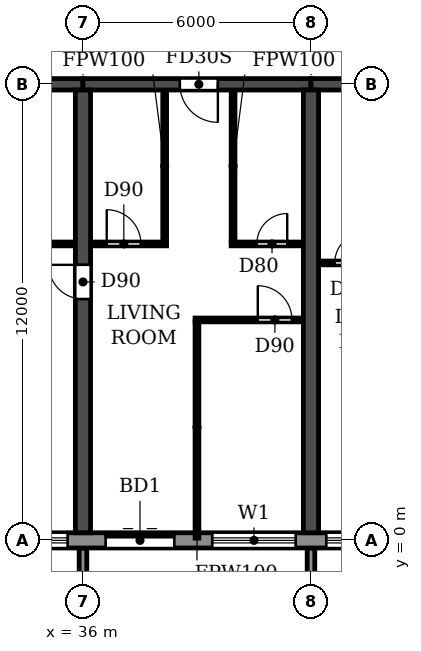
"""IFC4 building model, lengths in metres.
Left out: names, types, materials, properties, quantities, classifications, styles, units other than length and angle.
Written with IfcOpenShell. Run it as: python <this file> out.ifc"""

import sys

from ifc_helpers import new_model, si_unit, direction, frame, frame_2d, origin, place, context, subcontext, project, spatial, polyline, rectangle, outline, extrude, source, transform, mapped, element, fill, save


model = new_model("IFC4")
c1 = context("Model", 3, precision=1e-05, world=origin(), true_north=direction((0.0, 1.0)))
c2 = subcontext(c1, "Body", "Model", "MODEL_VIEW")
j1 = project(units=[si_unit("LENGTHUNIT", "METRE"), si_unit("PLANEANGLEUNIT", "RADIAN")], contexts=[c1])
p1 = place(None, origin())
s1 = spatial("IfcSite", under=j1, at=p1, CompositionType="ELEMENT")
p2 = place(p1, origin())
s2 = spatial("IfcBuilding", under=s1, at=p2, CompositionType="ELEMENT")
p3 = place(p2, frame((0.0, 0.0, 26.7)))
s3 = spatial("IfcBuildingStorey", under=s2, at=p3, CompositionType="ELEMENT", Elevation=26.7)
p4 = place(p3, frame((36.0, 0.2, 0.0), z_axis=(0.0, 0.0, 1.0), x_axis=(0.0, 1.0, 0.0)))
e1 = element("IfcWall", 1, at=p4, inside=s3, PredefinedType="SHEAR", context=c2, shape_type="SweptSolid", body=[
    extrude(rectangle(XDim=11.65, YDim=0.4, at=frame_2d((5.825, 0.0))), origin(), (0.0, 0.0, 1.0), 3.05),
])
p5 = place(p4, frame((6.15, 0.0, 0.0)))
e2 = element("IfcOpeningElement", 2, at=p5, cuts=e1, PredefinedType="OPENING", context=c2, shape_type="SweptSolid", body=[
    extrude(rectangle(XDim=0.9, YDim=2.1, at=frame_2d((0.45, 1.05))), frame((0.0, 0.21, 0.0), z_axis=(0.0, -1.0, 0.0), x_axis=(1.0, 0.0, 0.0)), (0.0, 0.0, 1.0), 0.42),
])
p6 = place(p3, frame((42.0, 0.2, 0.0), z_axis=(0.0, 0.0, 1.0), x_axis=(0.0, 1.0, 0.0)))
e3 = element("IfcWall", 3, at=p6, inside=s3, PredefinedType="SHEAR", context=c2, shape_type="SweptSolid", body=[
    extrude(rectangle(XDim=11.65, YDim=0.4, at=frame_2d((5.825, 0.0))), origin(), (0.0, 0.0, 1.0), 3.05),
])
p7 = place(p3, frame((30.0, 12.0, 0.0), z_axis=(0.0, 0.0, 1.0), x_axis=(1.0, 0.0, 0.0)))
e4 = element("IfcWall", 4, at=p7, inside=s3, PredefinedType="SHEAR", context=c2, shape_type="SweptSolid", body=[
    extrude(rectangle(XDim=6.0, YDim=0.3, at=frame_2d((3.0, 0.0))), origin(), (0.0, 0.0, 1.0), 2.45),
])
p8 = place(p3, frame((36.0, 12.0, 0.0), z_axis=(0.0, 0.0, 1.0), x_axis=(1.0, 0.0, 0.0)))
e5 = element("IfcWall", 5, at=p8, inside=s3, PredefinedType="SHEAR", context=c2, shape_type="SweptSolid", body=[
    extrude(rectangle(XDim=6.0, YDim=0.3, at=frame_2d((3.0, 0.0))), origin(), (0.0, 0.0, 1.0), 2.45),
])
p9 = place(p8, frame((2.55, 0.0, 0.0)))
e6 = element("IfcOpeningElement", 6, at=p9, cuts=e5, PredefinedType="OPENING", context=c2, shape_type="SweptSolid", body=[
    extrude(rectangle(XDim=1.0, YDim=2.1, at=frame_2d((0.5, 1.05))), frame((0.0, 0.16, 0.0), z_axis=(0.0, -1.0, 0.0), x_axis=(1.0, 0.0, 0.0)), (0.0, 0.0, 1.0), 0.32),
])
p10 = place(p3, frame((42.0, 12.0, 0.0), z_axis=(0.0, 0.0, 1.0), x_axis=(1.0, 0.0, 0.0)))
e7 = element("IfcWall", 7, at=p10, inside=s3, PredefinedType="SHEAR", context=c2, shape_type="SweptSolid", body=[
    extrude(rectangle(XDim=6.0, YDim=0.3, at=frame_2d((3.0, 0.0))), origin(), (0.0, 0.0, 1.0), 2.45),
])
p11 = place(p10, frame((2.45, 0.0, 0.0)))
e8 = element("IfcOpeningElement", 8, at=p11, cuts=e7, PredefinedType="OPENING", context=c2, shape_type="SweptSolid", body=[
    extrude(rectangle(XDim=1.0, YDim=2.1, at=frame_2d((0.5, 1.05))), frame((0.0, 0.16, 0.0), z_axis=(0.0, -1.0, 0.0), x_axis=(1.0, 0.0, 0.0)), (0.0, 0.0, 1.0), 0.32),
])
p12 = place(p3, frame((4.683, 0.0, 0.0), z_axis=(0.0, 0.0, 1.0), x_axis=(1.0, 0.0, 0.0)))
e9 = element("IfcWall", 9, at=p12, inside=s3, PredefinedType="STANDARD", context=c2, shape_type="SweptSolid", body=[
    extrude(rectangle(XDim=92.634, YDim=0.4, at=frame_2d((46.317, 0.0))), origin(), (0.0, 0.0, 1.0), 3.05),
])
p13 = place(p12, frame((1.717, 0.0, 0.9)))
e10 = element("IfcOpeningElement", 10, at=p13, cuts=e9, PredefinedType="OPENING", context=c2, shape_type="SweptSolid", body=[
    extrude(rectangle(XDim=2.2, YDim=1.5, at=frame_2d((1.1, 0.75))), frame((0.0, 0.21, 0.0), z_axis=(0.0, -1.0, 0.0), x_axis=(1.0, 0.0, 0.0)), (0.0, 0.0, 1.0), 0.42),
])
p14 = place(p12, frame((4.717, 0.0, 0.9)))
e11 = element("IfcOpeningElement", 11, at=p14, cuts=e9, PredefinedType="OPENING", context=c2, shape_type="SweptSolid", body=[
    extrude(rectangle(XDim=2.2, YDim=1.5, at=frame_2d((1.1, 0.75))), frame((0.0, 0.21, 0.0), z_axis=(0.0, -1.0, 0.0), x_axis=(1.0, 0.0, 0.0)), (0.0, 0.0, 1.0), 0.42),
])
p15 = place(p12, frame((7.717, 0.0, 0.9)))
e12 = element("IfcOpeningElement", 12, at=p15, cuts=e9, PredefinedType="OPENING", context=c2, shape_type="SweptSolid", body=[
    extrude(rectangle(XDim=2.2, YDim=1.5, at=frame_2d((1.1, 0.75))), frame((0.0, 0.21, 0.0), z_axis=(0.0, -1.0, 0.0), x_axis=(1.0, 0.0, 0.0)), (0.0, 0.0, 1.0), 0.42),
])
p16 = place(p12, frame((10.717, 0.0, 0.9)))
e13 = element("IfcOpeningElement", 13, at=p16, cuts=e9, PredefinedType="OPENING", context=c2, shape_type="SweptSolid", body=[
    extrude(rectangle(XDim=2.2, YDim=1.5, at=frame_2d((1.1, 0.75))), frame((0.0, 0.21, 0.0), z_axis=(0.0, -1.0, 0.0), x_axis=(1.0, 0.0, 0.0)), (0.0, 0.0, 1.0), 0.42),
])
p17 = place(p12, frame((13.717, 0.0, 0.9)))
e14 = element("IfcOpeningElement", 14, at=p17, cuts=e9, PredefinedType="OPENING", context=c2, shape_type="SweptSolid", body=[
    extrude(rectangle(XDim=2.2, YDim=1.5, at=frame_2d((1.1, 0.75))), frame((0.0, 0.21, 0.0), z_axis=(0.0, -1.0, 0.0), x_axis=(1.0, 0.0, 0.0)), (0.0, 0.0, 1.0), 0.42),
])
p18 = place(p12, frame((16.717, 0.0, 0.9)))
e15 = element("IfcOpeningElement", 15, at=p18, cuts=e9, PredefinedType="OPENING", context=c2, shape_type="SweptSolid", body=[
    extrude(rectangle(XDim=2.2, YDim=1.5, at=frame_2d((1.1, 0.75))), frame((0.0, 0.21, 0.0), z_axis=(0.0, -1.0, 0.0), x_axis=(1.0, 0.0, 0.0)), (0.0, 0.0, 1.0), 0.42),
])
p19 = place(p12, frame((19.917, 0.0, 0.0)))
e16 = element("IfcOpeningElement", 16, at=p19, cuts=e9, PredefinedType="OPENING", context=c2, shape_type="SweptSolid", body=[
    extrude(rectangle(XDim=1.8, YDim=2.4, at=frame_2d((0.9, 1.2))), frame((0.0, 0.21, 0.0), z_axis=(0.0, -1.0, 0.0), x_axis=(1.0, 0.0, 0.0)), (0.0, 0.0, 1.0), 0.42),
])
p20 = place(p12, frame((22.717, 0.0, 0.9)))
e17 = element("IfcOpeningElement", 17, at=p20, cuts=e9, PredefinedType="OPENING", context=c2, shape_type="SweptSolid", body=[
    extrude(rectangle(XDim=2.2, YDim=1.5, at=frame_2d((1.1, 0.75))), frame((0.0, 0.21, 0.0), z_axis=(0.0, -1.0, 0.0), x_axis=(1.0, 0.0, 0.0)), (0.0, 0.0, 1.0), 0.42),
])
p21 = place(p12, frame((25.717, 0.0, 0.9)))
e18 = element("IfcOpeningElement", 18, at=p21, cuts=e9, PredefinedType="OPENING", context=c2, shape_type="SweptSolid", body=[
    extrude(rectangle(XDim=2.2, YDim=1.5, at=frame_2d((1.1, 0.75))), frame((0.0, 0.21, 0.0), z_axis=(0.0, -1.0, 0.0), x_axis=(1.0, 0.0, 0.0)), (0.0, 0.0, 1.0), 0.42),
])
p22 = place(p12, frame((28.717, 0.0, 0.9)))
e19 = element("IfcOpeningElement", 19, at=p22, cuts=e9, PredefinedType="OPENING", context=c2, shape_type="SweptSolid", body=[
    extrude(rectangle(XDim=2.2, YDim=1.5, at=frame_2d((1.1, 0.75))), frame((0.0, 0.21, 0.0), z_axis=(0.0, -1.0, 0.0), x_axis=(1.0, 0.0, 0.0)), (0.0, 0.0, 1.0), 0.42),
])
p23 = place(p12, frame((31.917, 0.0, 0.0)))
e20 = element("IfcOpeningElement", 20, at=p23, cuts=e9, PredefinedType="OPENING", context=c2, shape_type="SweptSolid", body=[
    extrude(rectangle(XDim=1.8, YDim=2.4, at=frame_2d((0.9, 1.2))), frame((0.0, 0.21, 0.0), z_axis=(0.0, -1.0, 0.0), x_axis=(1.0, 0.0, 0.0)), (0.0, 0.0, 1.0), 0.42),
])
p24 = place(p12, frame((34.717, 0.0, 0.9)))
e21 = element("IfcOpeningElement", 21, at=p24, cuts=e9, PredefinedType="OPENING", context=c2, shape_type="SweptSolid", body=[
    extrude(rectangle(XDim=2.2, YDim=1.5, at=frame_2d((1.1, 0.75))), frame((0.0, 0.21, 0.0), z_axis=(0.0, -1.0, 0.0), x_axis=(1.0, 0.0, 0.0)), (0.0, 0.0, 1.0), 0.42),
])
p25 = place(p12, frame((37.717, 0.0, 0.9)))
e22 = element("IfcOpeningElement", 22, at=p25, cuts=e9, PredefinedType="OPENING", context=c2, shape_type="SweptSolid", body=[
    extrude(rectangle(XDim=2.2, YDim=1.5, at=frame_2d((1.1, 0.75))), frame((0.0, 0.21, 0.0), z_axis=(0.0, -1.0, 0.0), x_axis=(1.0, 0.0, 0.0)), (0.0, 0.0, 1.0), 0.42),
])
p26 = place(p12, frame((40.717, 0.0, 0.9)))
e23 = element("IfcOpeningElement", 23, at=p26, cuts=e9, PredefinedType="OPENING", context=c2, shape_type="SweptSolid", body=[
    extrude(rectangle(XDim=2.2, YDim=1.5, at=frame_2d((1.1, 0.75))), frame((0.0, 0.21, 0.0), z_axis=(0.0, -1.0, 0.0), x_axis=(1.0, 0.0, 0.0)), (0.0, 0.0, 1.0), 0.42),
])
p27 = place(p12, frame((43.917, 0.0, 0.0)))
e24 = element("IfcOpeningElement", 24, at=p27, cuts=e9, PredefinedType="OPENING", context=c2, shape_type="SweptSolid", body=[
    extrude(rectangle(XDim=1.8, YDim=2.4, at=frame_2d((0.9, 1.2))), frame((0.0, 0.21, 0.0), z_axis=(0.0, -1.0, 0.0), x_axis=(1.0, 0.0, 0.0)), (0.0, 0.0, 1.0), 0.42),
])
p28 = place(p12, frame((46.717, 0.0, 0.9)))
e25 = element("IfcOpeningElement", 25, at=p28, cuts=e9, PredefinedType="OPENING", context=c2, shape_type="SweptSolid", body=[
    extrude(rectangle(XDim=2.2, YDim=1.5, at=frame_2d((1.1, 0.75))), frame((0.0, 0.21, 0.0), z_axis=(0.0, -1.0, 0.0), x_axis=(1.0, 0.0, 0.0)), (0.0, 0.0, 1.0), 0.42),
])
p29 = place(p12, frame((49.717, 0.0, 0.9)))
e26 = element("IfcOpeningElement", 26, at=p29, cuts=e9, PredefinedType="OPENING", context=c2, shape_type="SweptSolid", body=[
    extrude(rectangle(XDim=2.2, YDim=1.5, at=frame_2d((1.1, 0.75))), frame((0.0, 0.21, 0.0), z_axis=(0.0, -1.0, 0.0), x_axis=(1.0, 0.0, 0.0)), (0.0, 0.0, 1.0), 0.42),
])
p30 = place(p12, frame((52.717, 0.0, 0.9)))
e27 = element("IfcOpeningElement", 27, at=p30, cuts=e9, PredefinedType="OPENING", context=c2, shape_type="SweptSolid", body=[
    extrude(rectangle(XDim=2.2, YDim=1.5, at=frame_2d((1.1, 0.75))), frame((0.0, 0.21, 0.0), z_axis=(0.0, -1.0, 0.0), x_axis=(1.0, 0.0, 0.0)), (0.0, 0.0, 1.0), 0.42),
])
p31 = place(p12, frame((55.717, 0.0, 0.9)))
e28 = element("IfcOpeningElement", 28, at=p31, cuts=e9, PredefinedType="OPENING", context=c2, shape_type="SweptSolid", body=[
    extrude(rectangle(XDim=2.2, YDim=1.5, at=frame_2d((1.1, 0.75))), frame((0.0, 0.21, 0.0), z_axis=(0.0, -1.0, 0.0), x_axis=(1.0, 0.0, 0.0)), (0.0, 0.0, 1.0), 0.42),
])
p32 = place(p12, frame((58.917, 0.0, 0.0)))
e29 = element("IfcOpeningElement", 29, at=p32, cuts=e9, PredefinedType="OPENING", context=c2, shape_type="SweptSolid", body=[
    extrude(rectangle(XDim=1.8, YDim=2.4, at=frame_2d((0.9, 1.2))), frame((0.0, 0.21, 0.0), z_axis=(0.0, -1.0, 0.0), x_axis=(1.0, 0.0, 0.0)), (0.0, 0.0, 1.0), 0.42),
])
p33 = place(p12, frame((61.717, 0.0, 0.9)))
e30 = element("IfcOpeningElement", 30, at=p33, cuts=e9, PredefinedType="OPENING", context=c2, shape_type="SweptSolid", body=[
    extrude(rectangle(XDim=2.2, YDim=1.5, at=frame_2d((1.1, 0.75))), frame((0.0, 0.21, 0.0), z_axis=(0.0, -1.0, 0.0), x_axis=(1.0, 0.0, 0.0)), (0.0, 0.0, 1.0), 0.42),
])
p34 = place(p12, frame((64.717, 0.0, 0.9)))
e31 = element("IfcOpeningElement", 31, at=p34, cuts=e9, PredefinedType="OPENING", context=c2, shape_type="SweptSolid", body=[
    extrude(rectangle(XDim=2.2, YDim=1.5, at=frame_2d((1.1, 0.75))), frame((0.0, 0.21, 0.0), z_axis=(0.0, -1.0, 0.0), x_axis=(1.0, 0.0, 0.0)), (0.0, 0.0, 1.0), 0.42),
])
p35 = place(p12, frame((67.717, 0.0, 0.9)))
e32 = element("IfcOpeningElement", 32, at=p35, cuts=e9, PredefinedType="OPENING", context=c2, shape_type="SweptSolid", body=[
    extrude(rectangle(XDim=2.2, YDim=1.5, at=frame_2d((1.1, 0.75))), frame((0.0, 0.21, 0.0), z_axis=(0.0, -1.0, 0.0), x_axis=(1.0, 0.0, 0.0)), (0.0, 0.0, 1.0), 0.42),
])
p36 = place(p12, frame((70.917, 0.0, 0.0)))
e33 = element("IfcOpeningElement", 33, at=p36, cuts=e9, PredefinedType="OPENING", context=c2, shape_type="SweptSolid", body=[
    extrude(rectangle(XDim=1.8, YDim=2.4, at=frame_2d((0.9, 1.2))), frame((0.0, 0.21, 0.0), z_axis=(0.0, -1.0, 0.0), x_axis=(1.0, 0.0, 0.0)), (0.0, 0.0, 1.0), 0.42),
])
p37 = place(p12, frame((73.717, 0.0, 0.9)))
e34 = element("IfcOpeningElement", 34, at=p37, cuts=e9, PredefinedType="OPENING", context=c2, shape_type="SweptSolid", body=[
    extrude(rectangle(XDim=2.2, YDim=1.5, at=frame_2d((1.1, 0.75))), frame((0.0, 0.21, 0.0), z_axis=(0.0, -1.0, 0.0), x_axis=(1.0, 0.0, 0.0)), (0.0, 0.0, 1.0), 0.42),
])
p38 = place(p12, frame((76.717, 0.0, 0.9)))
e35 = element("IfcOpeningElement", 35, at=p38, cuts=e9, PredefinedType="OPENING", context=c2, shape_type="SweptSolid", body=[
    extrude(rectangle(XDim=2.2, YDim=1.5, at=frame_2d((1.1, 0.75))), frame((0.0, 0.21, 0.0), z_axis=(0.0, -1.0, 0.0), x_axis=(1.0, 0.0, 0.0)), (0.0, 0.0, 1.0), 0.42),
])
p39 = place(p12, frame((79.717, 0.0, 0.9)))
e36 = element("IfcOpeningElement", 36, at=p39, cuts=e9, PredefinedType="OPENING", context=c2, shape_type="SweptSolid", body=[
    extrude(rectangle(XDim=2.2, YDim=1.5, at=frame_2d((1.1, 0.75))), frame((0.0, 0.21, 0.0), z_axis=(0.0, -1.0, 0.0), x_axis=(1.0, 0.0, 0.0)), (0.0, 0.0, 1.0), 0.42),
])
p40 = place(p12, frame((82.717, 0.0, 0.9)))
e37 = element("IfcOpeningElement", 37, at=p40, cuts=e9, PredefinedType="OPENING", context=c2, shape_type="SweptSolid", body=[
    extrude(rectangle(XDim=2.2, YDim=1.5, at=frame_2d((1.1, 0.75))), frame((0.0, 0.21, 0.0), z_axis=(0.0, -1.0, 0.0), x_axis=(1.0, 0.0, 0.0)), (0.0, 0.0, 1.0), 0.42),
])
p41 = place(p12, frame((85.717, 0.0, 0.9)))
e38 = element("IfcOpeningElement", 38, at=p41, cuts=e9, PredefinedType="OPENING", context=c2, shape_type="SweptSolid", body=[
    extrude(rectangle(XDim=2.2, YDim=1.5, at=frame_2d((1.1, 0.75))), frame((0.0, 0.21, 0.0), z_axis=(0.0, -1.0, 0.0), x_axis=(1.0, 0.0, 0.0)), (0.0, 0.0, 1.0), 0.42),
])
p42 = place(p12, frame((88.717, 0.0, 0.9)))
e39 = element("IfcOpeningElement", 39, at=p42, cuts=e9, PredefinedType="OPENING", context=c2, shape_type="SweptSolid", body=[
    extrude(rectangle(XDim=2.2, YDim=1.5, at=frame_2d((1.1, 0.75))), frame((0.0, 0.21, 0.0), z_axis=(0.0, -1.0, 0.0), x_axis=(1.0, 0.0, 0.0)), (0.0, 0.0, 1.0), 0.42),
])
m1 = source(origin(), c2, "Body", "SweptSolid", [
    extrude(outline(polyline([(0.0, 0.0), (0.2, 0.0), (0.2, 1.65), (0.0, 1.65), (0.0, 0.0)])), origin(), (0.0, 0.0, 1.0), 3.1),
])
for number, where in (
    (40, (35.9, -1.85, 0.0)),
    (41, (41.9, -1.85, 0.0)),
):
    element("IfcWall", number, at=place(p3, frame(where)), inside=s3, PredefinedType="STANDARD", context=c2, shape_type="MappedRepresentation", body=[
        mapped(m1, transform((0.0, 0.0, 0.0))),
    ])
p43 = place(p3, frame((38.95, 5.8, 0.0), z_axis=(0.0, 0.0, 1.0), x_axis=(1.0, 0.0, 0.0)))
e42 = element("IfcWall", 42, at=p43, inside=s3, PredefinedType="PARTITIONING", context=c2, shape_type="SweptSolid", body=[
    extrude(rectangle(XDim=2.84, YDim=0.1, at=frame_2d((1.42, 0.0))), origin(), (0.0, 0.0, 1.0), 3.05),
])
p44 = place(p43, frame((1.65, 0.0, 0.0)))
e43 = element("IfcOpeningElement", 43, at=p44, cuts=e42, PredefinedType="OPENING", context=c2, shape_type="SweptSolid", body=[
    extrude(rectangle(XDim=0.9, YDim=2.1, at=frame_2d((0.45, 1.05))), frame((0.0, 0.06, 0.0), z_axis=(0.0, -1.0, 0.0), x_axis=(1.0, 0.0, 0.0)), (0.0, 0.0, 1.0), 0.12),
])
p45 = place(p3, frame((42.21, 7.3, 0.0), z_axis=(0.0, 0.0, 1.0), x_axis=(1.0, 0.0, 0.0)))
e44 = element("IfcWall", 44, at=p45, inside=s3, PredefinedType="PARTITIONING", context=c2, shape_type="SweptSolid", body=[
    extrude(rectangle(XDim=1.89, YDim=0.1, at=frame_2d((0.945, 0.0))), origin(), (0.0, 0.0, 1.0), 3.05),
])
p46 = place(p45, frame((0.415, 0.0, 0.0)))
e45 = element("IfcOpeningElement", 45, at=p46, cuts=e44, PredefinedType="OPENING", context=c2, shape_type="SweptSolid", body=[
    extrude(rectangle(XDim=0.8, YDim=2.1, at=frame_2d((0.4, 1.05))), frame((0.0, 0.06, 0.0), z_axis=(0.0, -1.0, 0.0), x_axis=(1.0, 0.0, 0.0)), (0.0, 0.0, 1.0), 0.12),
])
p47 = place(p3, frame((33.1, 7.8, 0.0), z_axis=(0.0, 0.0, 1.0), x_axis=(1.0, 0.0, 0.0)))
e46 = element("IfcWall", 46, at=p47, inside=s3, PredefinedType="PARTITIONING", context=c2, shape_type="SweptSolid", body=[
    extrude(rectangle(XDim=2.69, YDim=0.1, at=frame_2d((1.345, 0.0))), origin(), (0.0, 0.0, 1.0), 3.05),
])
p48 = place(p47, frame((1.0, 0.0, 0.0)))
e47 = element("IfcOpeningElement", 47, at=p48, cuts=e46, PredefinedType="OPENING", context=c2, shape_type="SweptSolid", body=[
    extrude(rectangle(XDim=0.8, YDim=2.1, at=frame_2d((0.4, 1.05))), frame((0.0, 0.06, 0.0), z_axis=(0.0, -1.0, 0.0), x_axis=(1.0, 0.0, 0.0)), (0.0, 0.0, 1.0), 0.12),
])
p49 = place(p3, frame((36.21, 7.8, 0.0), z_axis=(0.0, 0.0, 1.0), x_axis=(1.0, 0.0, 0.0)))
e48 = element("IfcWall", 48, at=p49, inside=s3, PredefinedType="PARTITIONING", context=c2, shape_type="SweptSolid", body=[
    extrude(rectangle(XDim=1.99, YDim=0.1, at=frame_2d((0.995, 0.0))), origin(), (0.0, 0.0, 1.0), 3.05),
])
p50 = place(p49, frame((0.415, 0.0, 0.0)))
e49 = element("IfcOpeningElement", 49, at=p50, cuts=e48, PredefinedType="OPENING", context=c2, shape_type="SweptSolid", body=[
    extrude(rectangle(XDim=0.9, YDim=2.1, at=frame_2d((0.45, 1.05))), frame((0.0, 0.06, 0.0), z_axis=(0.0, -1.0, 0.0), x_axis=(1.0, 0.0, 0.0)), (0.0, 0.0, 1.0), 0.12),
])
p51 = place(p3, frame((39.9, 7.8, 0.0), z_axis=(0.0, 0.0, 1.0), x_axis=(1.0, 0.0, 0.0)))
e50 = element("IfcWall", 50, at=p51, inside=s3, PredefinedType="PARTITIONING", context=c2, shape_type="SweptSolid", body=[
    extrude(rectangle(XDim=1.89, YDim=0.1, at=frame_2d((0.945, 0.0))), origin(), (0.0, 0.0, 1.0), 3.05),
])
p52 = place(p51, frame((0.675, 0.0, 0.0)))
e51 = element("IfcOpeningElement", 51, at=p52, cuts=e50, PredefinedType="OPENING", context=c2, shape_type="SweptSolid", body=[
    extrude(rectangle(XDim=0.8, YDim=2.1, at=frame_2d((0.4, 1.05))), frame((0.0, 0.06, 0.0), z_axis=(0.0, -1.0, 0.0), x_axis=(1.0, 0.0, 0.0)), (0.0, 0.0, 1.0), 0.12),
])
p53 = place(p3, frame((38.15, 7.85, 0.0), z_axis=(0.0, 0.0, 1.0), x_axis=(0.0, 1.0, 0.0)))
e52 = element("IfcWall", 52, at=p53, inside=s3, PredefinedType="PARTITIONING", context=c2, shape_type="SweptSolid", body=[
    extrude(rectangle(XDim=3.99, YDim=0.1, at=frame_2d((1.995, 0.0))), origin(), (0.0, 0.0, 1.0), 3.05),
])
p54 = place(p3, frame((39.0, 0.06, 0.0), z_axis=(0.0, 0.0, 1.0), x_axis=(0.0, 1.0, 0.0)))
e53 = element("IfcWall", 53, at=p54, inside=s3, PredefinedType="PARTITIONING", context=c2, shape_type="SweptSolid", body=[
    extrude(rectangle(XDim=5.69, YDim=0.1, at=frame_2d((2.845, 0.0))), origin(), (0.0, 0.0, 1.0), 3.05),
])
p55 = place(p3, frame((39.95, 7.85, 0.0), z_axis=(0.0, 0.0, 1.0), x_axis=(0.0, 1.0, 0.0)))
e54 = element("IfcWall", 54, at=p55, inside=s3, PredefinedType="PARTITIONING", context=c2, shape_type="SweptSolid", body=[
    extrude(rectangle(XDim=3.99, YDim=0.1, at=frame_2d((1.995, 0.0))), origin(), (0.0, 0.0, 1.0), 3.05),
])
p56 = place(p22, origin())
e55 = element("IfcWindow", 55, at=p56, inside=s3, PartitioningType="DOUBLE_PANEL_HORIZONTAL", PredefinedType="WINDOW", context=c2, shape_type="SweptSolid", body=[
    extrude(rectangle(XDim=2.2, YDim=1.5, at=frame_2d((1.1, 0.75))), frame((0.0, 0.03, 0.0), z_axis=(0.0, -1.0, 0.0), x_axis=(1.0, 0.0, 0.0)), (0.0, 0.0, 1.0), 0.06),
])
fill(e19, e55)
p57 = place(p23, origin())
e56 = element("IfcDoor", 56, at=p57, inside=s3, OperationType="DOUBLE_DOOR_SLIDING", PredefinedType="DOOR", context=c2, shape_type="SweptSolid", body=[
    extrude(rectangle(XDim=1.8, YDim=2.4, at=frame_2d((0.9, 1.2))), frame((0.0, 0.025, 0.0), z_axis=(0.0, -1.0, 0.0), x_axis=(1.0, 0.0, 0.0)), (0.0, 0.0, 1.0), 0.05),
])
fill(e20, e56)
p58 = place(p24, origin())
e57 = element("IfcWindow", 57, at=p58, inside=s3, PartitioningType="DOUBLE_PANEL_HORIZONTAL", PredefinedType="WINDOW", context=c2, shape_type="SweptSolid", body=[
    extrude(rectangle(XDim=2.2, YDim=1.5, at=frame_2d((1.1, 0.75))), frame((0.0, 0.03, 0.0), z_axis=(0.0, -1.0, 0.0), x_axis=(1.0, 0.0, 0.0)), (0.0, 0.0, 1.0), 0.06),
])
fill(e21, e57)
p59 = place(p25, origin())
e58 = element("IfcWindow", 58, at=p59, inside=s3, PartitioningType="DOUBLE_PANEL_HORIZONTAL", PredefinedType="WINDOW", context=c2, shape_type="SweptSolid", body=[
    extrude(rectangle(XDim=2.2, YDim=1.5, at=frame_2d((1.1, 0.75))), frame((0.0, 0.03, 0.0), z_axis=(0.0, -1.0, 0.0), x_axis=(1.0, 0.0, 0.0)), (0.0, 0.0, 1.0), 0.06),
])
fill(e22, e58)
p60 = place(p5, origin())
e59 = element("IfcDoor", 59, at=p60, inside=s3, OperationType="SINGLE_SWING_RIGHT", PredefinedType="DOOR", context=c2, shape_type="SweptSolid", body=[
    extrude(rectangle(XDim=0.9, YDim=2.1, at=frame_2d((0.45, 1.05))), frame((0.0, 0.025, 0.0), z_axis=(0.0, -1.0, 0.0), x_axis=(1.0, 0.0, 0.0)), (0.0, 0.0, 1.0), 0.05),
])
fill(e2, e59)
p61 = place(p50, origin())
e60 = element("IfcDoor", 60, at=p61, inside=s3, OperationType="SINGLE_SWING_LEFT", PredefinedType="DOOR", context=c2, shape_type="SweptSolid", body=[
    extrude(rectangle(XDim=0.9, YDim=2.1, at=frame_2d((0.45, 1.05))), frame((0.0, 0.025, 0.0), z_axis=(0.0, -1.0, 0.0), x_axis=(1.0, 0.0, 0.0)), (0.0, 0.0, 1.0), 0.05),
])
fill(e49, e60)
p62 = place(p9, frame((1.0, 0.0, 0.0), z_axis=(0.0, 0.0, 1.0), x_axis=(-1.0, 0.0, 0.0)))
e61 = element("IfcDoor", 61, at=p62, inside=s3, OperationType="SINGLE_SWING_LEFT", PredefinedType="DOOR", context=c2, shape_type="SweptSolid", body=[
    extrude(rectangle(XDim=1.0, YDim=2.1, at=frame_2d((0.5, 1.05))), frame((0.0, 0.025, 0.0), z_axis=(0.0, -1.0, 0.0), x_axis=(1.0, 0.0, 0.0)), (0.0, 0.0, 1.0), 0.05),
])
fill(e6, e61)
p63 = place(p52, origin())
e62 = element("IfcDoor", 62, at=p63, inside=s3, OperationType="SINGLE_SWING_RIGHT", PredefinedType="DOOR", context=c2, shape_type="SweptSolid", body=[
    extrude(rectangle(XDim=0.8, YDim=2.1, at=frame_2d((0.4, 1.05))), frame((0.0, 0.025, 0.0), z_axis=(0.0, -1.0, 0.0), x_axis=(1.0, 0.0, 0.0)), (0.0, 0.0, 1.0), 0.05),
])
fill(e51, e62)
p64 = place(p44, origin())
e63 = element("IfcDoor", 63, at=p64, inside=s3, OperationType="SINGLE_SWING_LEFT", PredefinedType="DOOR", context=c2, shape_type="SweptSolid", body=[
    extrude(rectangle(XDim=0.9, YDim=2.1, at=frame_2d((0.45, 1.05))), frame((0.0, 0.025, 0.0), z_axis=(0.0, -1.0, 0.0), x_axis=(1.0, 0.0, 0.0)), (0.0, 0.0, 1.0), 0.05),
])
fill(e43, e63)
p65 = place(p46, origin())
e64 = element("IfcDoor", 64, at=p65, inside=s3, OperationType="SINGLE_SWING_RIGHT", PredefinedType="DOOR", context=c2, shape_type="SweptSolid", body=[
    extrude(rectangle(XDim=0.8, YDim=2.1, at=frame_2d((0.4, 1.05))), frame((0.0, 0.025, 0.0), z_axis=(0.0, -1.0, 0.0), x_axis=(1.0, 0.0, 0.0)), (0.0, 0.0, 1.0), 0.05),
])
fill(e45, e64)
save(model, sys.argv[1])
